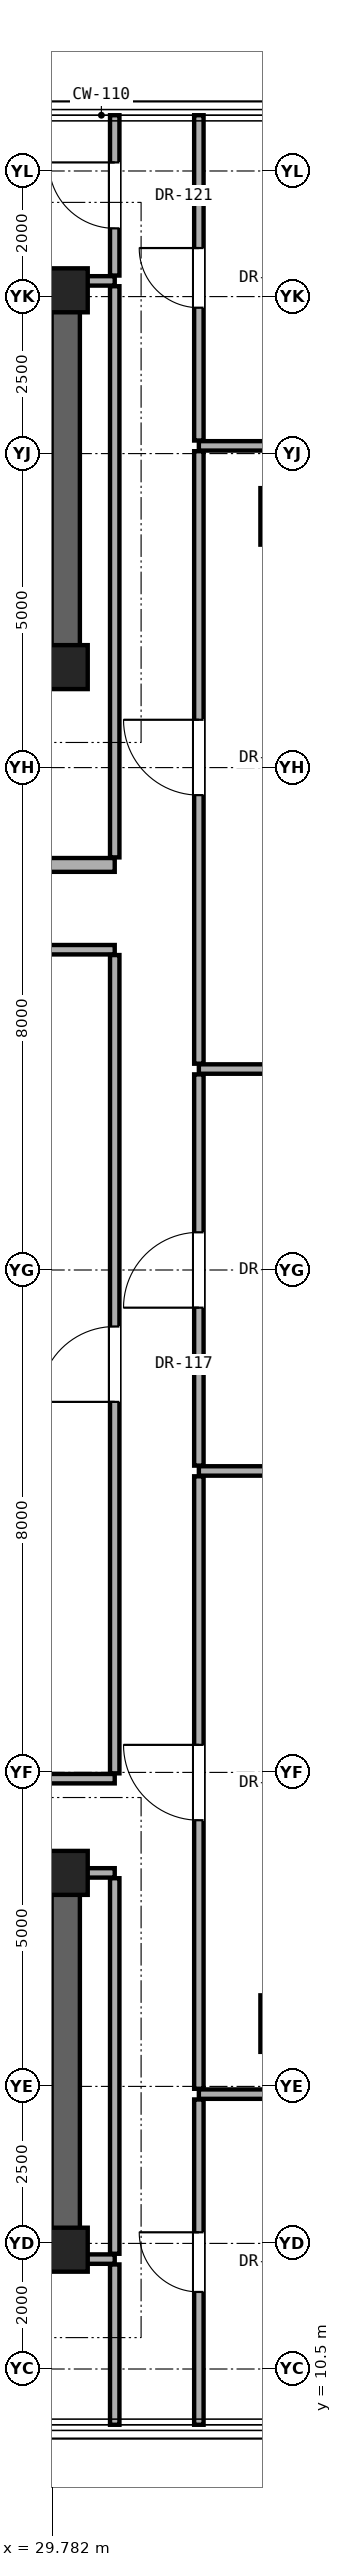
"""IFC4 building model, lengths in metres.
Left out: names, types, materials, properties, quantities, classifications, styles, units other than length and angle.
Written with IfcOpenShell. Run it as: python <this file> out.ifc"""

import sys

from ifc_helpers import new_model, si_unit, direction, frame, frame_2d, origin, origin_2d, place, context, subcontext, project, spatial, rectangle, extrude, element, fill, save


model = new_model("IFC4")
c1 = context("Model", 3, precision=1e-05, world=origin(), true_north=direction((0.0, 1.0)))
c2 = subcontext(c1, "Body", "Model", "MODEL_VIEW")
j1 = project(units=[si_unit("LENGTHUNIT", "METRE"), si_unit("PLANEANGLEUNIT", "RADIAN")], contexts=[c1])
p1 = place(None, origin())
s1 = spatial("IfcSite", under=j1, at=p1, CompositionType="ELEMENT")
p2 = place(p1, origin())
s2 = spatial("IfcBuilding", under=s1, at=p2, CompositionType="ELEMENT")
p3 = place(p2, frame((0.0, 0.0, 252.7)))
s3 = spatial("IfcBuildingStorey", under=s2, at=p3, CompositionType="ELEMENT", Elevation=252.7)
for number, where, z_axis, x_axis in (
    (1, (30.0, 12.4, 0.0), (0.0, 0.0, 1.0), (1.0, 0.0, 0.0)),
    (2, (30.0, 18.4, 0.0), (0.0, 0.0, 1.0), (1.0, 0.0, 0.0)),
    (3, (30.0, 37.6, 0.0), (0.0, 0.0, 1.0), (1.0, 0.0, 0.0)),
    (4, (30.0, 43.6, 0.0), (0.0, 0.0, 1.0), (1.0, 0.0, 0.0)),
):
    element("IfcColumn", number, at=place(p3, frame(where, z_axis=z_axis, x_axis=x_axis)), inside=s3, PredefinedType="COLUMN", context=c2, shape_type="SweptSolid", body=[
        extrude(rectangle(XDim=0.7, YDim=0.7, at=origin_2d()), origin(), (0.0, 0.0, 1.0), 3.6),
    ])
for number, where, z_axis, x_axis in (
    (5, (33.4, 16.0, 0.0), (0.0, 0.0, 1.0), (1.0, 0.0, 0.0)),
    (6, (33.4, 40.0, 0.0), (0.0, 0.0, 1.0), (1.0, 0.0, 0.0)),
):
    element("IfcColumn", number, at=place(p3, frame(where, z_axis=z_axis, x_axis=x_axis)), inside=s3, PredefinedType="PILASTER", context=c2, shape_type="SweptSolid", body=[
        extrude(rectangle(XDim=0.6, YDim=0.9, at=origin_2d()), origin(), (0.0, 0.0, 1.0), 3.6),
    ])
p4 = place(p3, frame((11.0, 43.6, 0.0), z_axis=(0.0, 0.0, 1.0), x_axis=(1.0, 0.0, 0.0)))
e7 = element("IfcWall", 7, at=p4, inside=s3, PredefinedType="SHEAR", context=c2, shape_type="SweptSolid", body=[
    extrude(rectangle(XDim=19.0, YDim=0.45, at=frame_2d((9.5, 0.0))), origin(), (0.0, 0.0, 1.0), 3.4),
])
p5 = place(p3, frame((30.0, 37.6, 0.0), z_axis=(0.0, 0.0, 1.0), x_axis=(0.0, 1.0, 0.0)))
e8 = element("IfcWall", 8, at=p5, inside=s3, PredefinedType="SHEAR", context=c2, shape_type="SweptSolid", body=[
    extrude(rectangle(XDim=6.0, YDim=0.45, at=frame_2d((3.0, 0.0))), origin(), (0.0, 0.0, 1.0), 3.4),
])
p6 = place(p3, frame((11.0, 37.6, 0.0), z_axis=(0.0, 0.0, 1.0), x_axis=(1.0, 0.0, 0.0)))
e9 = element("IfcWall", 9, at=p6, inside=s3, PredefinedType="SHEAR", context=c2, shape_type="SweptSolid", body=[
    extrude(rectangle(XDim=19.0, YDim=0.45, at=frame_2d((9.5, 0.0))), origin(), (0.0, 0.0, 1.0), 3.4),
])
p7 = place(p6, frame((1.06, 0.0, 0.0)))
e10 = element("IfcOpeningElement", 10, at=p7, cuts=e9, PredefinedType="OPENING", context=c2, shape_type="SweptSolid", body=[
    extrude(rectangle(XDim=1.15, YDim=2.2, at=frame_2d((0.575, 1.1))), frame((0.0, 0.235, 0.0), z_axis=(0.0, -1.0, 0.0), x_axis=(1.0, 0.0, 0.0)), (0.0, 0.0, 1.0), 0.47),
])
p8 = place(p6, frame((9.55, 0.0, 0.0)))
e11 = element("IfcOpeningElement", 11, at=p8, cuts=e9, PredefinedType="OPENING", context=c2, shape_type="SweptSolid", body=[
    extrude(rectangle(XDim=1.4, YDim=2.35, at=frame_2d((0.7, 1.175))), frame((0.0, 0.235, 0.0), z_axis=(0.0, -1.0, 0.0), x_axis=(1.0, 0.0, 0.0)), (0.0, 0.0, 1.0), 0.47),
])
p9 = place(p6, frame((11.95, 0.0, 0.0)))
e12 = element("IfcOpeningElement", 12, at=p9, cuts=e9, PredefinedType="OPENING", context=c2, shape_type="SweptSolid", body=[
    extrude(rectangle(XDim=1.4, YDim=2.35, at=frame_2d((0.7, 1.175))), frame((0.0, 0.235, 0.0), z_axis=(0.0, -1.0, 0.0), x_axis=(1.0, 0.0, 0.0)), (0.0, 0.0, 1.0), 0.47),
])
p10 = place(p3, frame((11.0, 12.4, 0.0), z_axis=(0.0, 0.0, 1.0), x_axis=(1.0, 0.0, 0.0)))
e13 = element("IfcWall", 13, at=p10, inside=s3, PredefinedType="SHEAR", context=c2, shape_type="SweptSolid", body=[
    extrude(rectangle(XDim=19.0, YDim=0.45, at=frame_2d((9.5, 0.0))), origin(), (0.0, 0.0, 1.0), 3.4),
])
p11 = place(p3, frame((30.0, 12.4, 0.0), z_axis=(0.0, 0.0, 1.0), x_axis=(0.0, 1.0, 0.0)))
e14 = element("IfcWall", 14, at=p11, inside=s3, PredefinedType="SHEAR", context=c2, shape_type="SweptSolid", body=[
    extrude(rectangle(XDim=6.0, YDim=0.45, at=frame_2d((3.0, 0.0))), origin(), (0.0, 0.0, 1.0), 3.4),
])
p12 = place(p3, frame((11.0, 18.4, 0.0), z_axis=(0.0, 0.0, 1.0), x_axis=(1.0, 0.0, 0.0)))
e15 = element("IfcWall", 15, at=p12, inside=s3, PredefinedType="SHEAR", context=c2, shape_type="SweptSolid", body=[
    extrude(rectangle(XDim=19.0, YDim=0.45, at=frame_2d((9.5, 0.0))), origin(), (0.0, 0.0, 1.0), 3.4),
])
p13 = place(p12, frame((4.175, 0.0, 0.0)))
e16 = element("IfcOpeningElement", 16, at=p13, cuts=e15, PredefinedType="OPENING", context=c2, shape_type="SweptSolid", body=[
    extrude(rectangle(XDim=1.2, YDim=2.25, at=frame_2d((0.6, 1.125))), frame((0.0, 0.235, 0.0), z_axis=(0.0, -1.0, 0.0), x_axis=(1.0, 0.0, 0.0)), (0.0, 0.0, 1.0), 0.47),
])
p14 = place(p12, frame((11.075, 0.0, 0.0)))
e17 = element("IfcOpeningElement", 17, at=p14, cuts=e15, PredefinedType="OPENING", context=c2, shape_type="SweptSolid", body=[
    extrude(rectangle(XDim=0.95, YDim=2.15, at=frame_2d((0.475, 1.075))), frame((0.0, 0.235, 0.0), z_axis=(0.0, -1.0, 0.0), x_axis=(1.0, 0.0, 0.0)), (0.0, 0.0, 1.0), 0.47),
])
p15 = place(p12, frame((14.3, 0.0, 0.0)))
e18 = element("IfcOpeningElement", 18, at=p15, cuts=e15, PredefinedType="OPENING", context=c2, shape_type="SweptSolid", body=[
    extrude(rectangle(XDim=1.3, YDim=2.3, at=frame_2d((0.65, 1.15))), frame((0.0, 0.235, 0.0), z_axis=(0.0, -1.0, 0.0), x_axis=(1.0, 0.0, 0.0)), (0.0, 0.0, 1.0), 0.47),
])
p16 = place(p12, frame((16.6, 0.0, 0.0)))
e19 = element("IfcOpeningElement", 19, at=p16, cuts=e15, PredefinedType="OPENING", context=c2, shape_type="SweptSolid", body=[
    extrude(rectangle(XDim=1.3, YDim=2.3, at=frame_2d((0.65, 1.15))), frame((0.0, 0.235, 0.0), z_axis=(0.0, -1.0, 0.0), x_axis=(1.0, 0.0, 0.0)), (0.0, 0.0, 1.0), 0.47),
])
p17 = place(p3, frame((30.22, 12.25, 0.0), z_axis=(0.0, 0.0, 1.0), x_axis=(1.0, 0.0, 0.0)))
e20 = element("IfcWall", 20, at=p17, inside=s3, PredefinedType="PARTITIONING", context=c2, shape_type="SweptSolid", body=[
    extrude(rectangle(XDim=0.56, YDim=0.15, at=frame_2d((0.28, 0.0))), origin(), (0.0, 0.0, 1.0), 3.4),
])
p18 = place(p3, frame((32.12, 14.877, 0.0), z_axis=(0.0, 0.0, 1.0), x_axis=(1.0, 0.0, 0.0)))
e21 = element("IfcWall", 21, at=p18, inside=s3, PredefinedType="PARTITIONING", context=c2, shape_type="SweptSolid", body=[
    extrude(rectangle(XDim=3.205, YDim=0.15, at=frame_2d((1.603, 0.0))), origin(), (0.0, 0.0, 1.0), 3.4),
])
p19 = place(p3, frame((30.22, 18.4, 0.0), z_axis=(0.0, 0.0, 1.0), x_axis=(1.0, 0.0, 0.0)))
e22 = element("IfcWall", 22, at=p19, inside=s3, PredefinedType="PARTITIONING", context=c2, shape_type="SweptSolid", body=[
    extrude(rectangle(XDim=0.56, YDim=0.15, at=frame_2d((0.28, 0.0))), origin(), (0.0, 0.0, 1.0), 2.792),
])
p20 = place(p3, frame((10.22, 19.9, 0.0), z_axis=(0.0, 0.0, 1.0), x_axis=(1.0, 0.0, 0.0)))
e23 = element("IfcWall", 23, at=p20, inside=s3, PredefinedType="PARTITIONING", context=c2, shape_type="SweptSolid", body=[
    extrude(rectangle(XDim=20.56, YDim=0.15, at=frame_2d((10.28, 0.0))), origin(), (0.0, 0.0, 1.0), 2.536),
])
p21 = place(p20, frame((1.36, 0.0, 0.0)))
e24 = element("IfcOpeningElement", 24, at=p21, cuts=e23, PredefinedType="OPENING", context=c2, shape_type="SweptSolid", body=[
    extrude(rectangle(XDim=0.9, YDim=2.1, at=frame_2d((0.45, 1.05))), frame((0.0, 0.085, 0.0), z_axis=(0.0, -1.0, 0.0), x_axis=(1.0, 0.0, 0.0)), (0.0, 0.0, 1.0), 0.17),
])
p22 = place(p20, frame((9.68, 0.0, 0.0)))
e25 = element("IfcOpeningElement", 25, at=p22, cuts=e23, PredefinedType="OPENING", context=c2, shape_type="SweptSolid", body=[
    extrude(rectangle(XDim=1.2, YDim=2.25, at=frame_2d((0.6, 1.125))), frame((0.0, 0.085, 0.0), z_axis=(0.0, -1.0, 0.0), x_axis=(1.0, 0.0, 0.0)), (0.0, 0.0, 1.0), 0.17),
])
for number, where, z_axis, x_axis in (
    (26, (32.12, 24.8, 0.0), (0.0, 0.0, 1.0), (1.0, 0.0, 0.0)),
    (27, (32.12, 31.2, 0.0), (0.0, 0.0, 1.0), (1.0, 0.0, 0.0)),
):
    element("IfcWall", number, at=place(p3, frame(where, z_axis=z_axis, x_axis=x_axis)), inside=s3, PredefinedType="PARTITIONING", context=c2, shape_type="SweptSolid", body=[
        extrude(rectangle(XDim=8.49, YDim=0.15, at=frame_2d((4.245, 0.0))), origin(), (0.0, 0.0, 1.0), 2.619),
    ])
p23 = place(p3, frame((10.22, 33.1, 0.0), z_axis=(0.0, 0.0, 1.0), x_axis=(1.0, 0.0, 0.0)))
e28 = element("IfcWall", 28, at=p23, inside=s3, PredefinedType="PARTITIONING", context=c2, shape_type="SweptSolid", body=[
    extrude(rectangle(XDim=20.56, YDim=0.15, at=frame_2d((10.28, 0.0))), origin(), (0.0, 0.0, 1.0), 2.536),
])
p24 = place(p3, frame((15.59, 34.45, 0.0), z_axis=(0.0, 0.0, 1.0), x_axis=(1.0, 0.0, 0.0)))
e29 = element("IfcWall", 29, at=p24, inside=s3, PredefinedType="SOLIDWALL", context=c2, shape_type="SweptSolid", body=[
    extrude(rectangle(XDim=15.19, YDim=0.22, at=frame_2d((7.595, 0.0))), origin(), (0.0, 0.0, 1.0), 2.536),
])
p25 = place(p24, frame((6.26, 0.0, 0.0)))
e30 = element("IfcOpeningElement", 30, at=p25, cuts=e29, PredefinedType="OPENING", context=c2, shape_type="SweptSolid", body=[
    extrude(rectangle(XDim=1.2, YDim=2.25, at=frame_2d((0.6, 1.125))), frame((0.0, 0.12, 0.0), z_axis=(0.0, -1.0, 0.0), x_axis=(1.0, 0.0, 0.0)), (0.0, 0.0, 1.0), 0.24),
])
p26 = place(p24, frame((11.085, 0.0, 0.0)))
e31 = element("IfcOpeningElement", 31, at=p26, cuts=e29, PredefinedType="OPENING", context=c2, shape_type="SweptSolid", body=[
    extrude(rectangle(XDim=0.95, YDim=2.15, at=frame_2d((0.475, 1.075))), frame((0.0, 0.12, 0.0), z_axis=(0.0, -1.0, 0.0), x_axis=(1.0, 0.0, 0.0)), (0.0, 0.0, 1.0), 0.24),
])
p27 = place(p24, frame((1.775, 0.0, 0.0)))
e32 = element("IfcOpeningElement", 32, at=p27, cuts=e29, PredefinedType="OPENING", context=c2, shape_type="SweptSolid", body=[
    extrude(rectangle(XDim=0.85, YDim=2.01, at=frame_2d((0.425, 1.005))), frame((0.0, 0.12, 0.0), z_axis=(0.0, -1.0, 0.0), x_axis=(1.0, 0.0, 0.0)), (0.0, 0.0, 1.0), 0.24),
])
p28 = place(p3, frame((32.12, 41.123, 0.0), z_axis=(0.0, 0.0, 1.0), x_axis=(1.0, 0.0, 0.0)))
e33 = element("IfcWall", 33, at=p28, inside=s3, PredefinedType="PARTITIONING", context=c2, shape_type="SweptSolid", body=[
    extrude(rectangle(XDim=3.205, YDim=0.15, at=frame_2d((1.603, 0.0))), origin(), (0.0, 0.0, 1.0), 3.4),
])
p29 = place(p3, frame((30.22, 43.75, 0.0), z_axis=(0.0, 0.0, 1.0), x_axis=(1.0, 0.0, 0.0)))
e34 = element("IfcWall", 34, at=p29, inside=s3, PredefinedType="PARTITIONING", context=c2, shape_type="SweptSolid", body=[
    extrude(rectangle(XDim=0.56, YDim=0.15, at=frame_2d((0.28, 0.0))), origin(), (0.0, 0.0, 1.0), 3.4),
])
p30 = place(p3, frame((30.78, 9.612, 0.0), z_axis=(0.0, 0.0, 1.0), x_axis=(0.0, 1.0, 0.0)))
e35 = element("IfcWall", 35, at=p30, inside=s3, PredefinedType="PARTITIONING", context=c2, shape_type="SweptSolid", body=[
    extrude(rectangle(XDim=2.553, YDim=0.15, at=frame_2d((1.276, 0.0))), origin(), (0.0, 0.0, 1.0), 3.4),
])
p31 = place(p3, frame((30.78, 12.335, 0.0), z_axis=(0.0, 0.0, 1.0), x_axis=(0.0, 1.0, 0.0)))
e36 = element("IfcWall", 36, at=p31, inside=s3, PredefinedType="PARTITIONING", context=c2, shape_type="SweptSolid", body=[
    extrude(rectangle(XDim=5.98, YDim=0.15, at=frame_2d((2.99, 0.0))), origin(), (0.0, 0.0, 1.0), 2.792),
])
p32 = place(p3, frame((30.78, 19.985, 0.0), z_axis=(0.0, 0.0, 1.0), x_axis=(0.0, 1.0, 0.0)))
e37 = element("IfcWall", 37, at=p32, inside=s3, PredefinedType="PARTITIONING", context=c2, shape_type="SweptSolid", body=[
    extrude(rectangle(XDim=13.03, YDim=0.15, at=frame_2d((6.515, 0.0))), origin(), (0.0, 0.0, 1.0), 2.696),
])
p33 = place(p32, frame((5.915, 0.0, 0.0)))
e38 = element("IfcOpeningElement", 38, at=p33, cuts=e37, PredefinedType="OPENING", context=c2, shape_type="SweptSolid", body=[
    extrude(rectangle(XDim=1.2, YDim=2.25, at=frame_2d((0.6, 1.125))), frame((0.0, 0.085, 0.0), z_axis=(0.0, -1.0, 0.0), x_axis=(1.0, 0.0, 0.0)), (0.0, 0.0, 1.0), 0.17),
])
p34 = place(p3, frame((30.78, 34.57, 0.0), z_axis=(0.0, 0.0, 1.0), x_axis=(0.0, 1.0, 0.0)))
e39 = element("IfcWall", 39, at=p34, inside=s3, PredefinedType="PARTITIONING", context=c2, shape_type="SweptSolid", body=[
    extrude(rectangle(XDim=9.095, YDim=0.15, at=frame_2d((4.547, 0.0))), origin(), (0.0, 0.0, 1.0), 2.792),
])
p35 = place(p3, frame((30.78, 43.835, 0.0), z_axis=(0.0, 0.0, 1.0), x_axis=(0.0, 1.0, 0.0)))
e40 = element("IfcWall", 40, at=p35, inside=s3, PredefinedType="PARTITIONING", context=c2, shape_type="SweptSolid", body=[
    extrude(rectangle(XDim=2.553, YDim=0.15, at=frame_2d((1.276, 0.0))), origin(), (0.0, 0.0, 1.0), 3.4),
])
p36 = place(p35, frame((0.751, 0.0, 0.0)))
e41 = element("IfcOpeningElement", 41, at=p36, cuts=e40, PredefinedType="OPENING", context=c2, shape_type="SweptSolid", body=[
    extrude(rectangle(XDim=1.05, YDim=2.2, at=frame_2d((0.525, 1.1))), frame((0.0, 0.085, 0.0), z_axis=(0.0, -1.0, 0.0), x_axis=(1.0, 0.0, 0.0)), (0.0, 0.0, 1.0), 0.17),
])
p37 = place(p3, frame((32.12, 9.612, 0.0), z_axis=(0.0, 0.0, 1.0), x_axis=(0.0, 1.0, 0.0)))
e42 = element("IfcWall", 42, at=p37, inside=s3, PredefinedType="PARTITIONING", context=c2, shape_type="SweptSolid", body=[
    extrude(rectangle(XDim=5.18, YDim=0.15, at=frame_2d((2.59, 0.0))), origin(), (0.0, 0.0, 1.0), 3.4),
])
p38 = place(p37, frame((2.115, 0.0, 0.0)))
e43 = element("IfcOpeningElement", 43, at=p38, cuts=e42, PredefinedType="OPENING", context=c2, shape_type="SweptSolid", body=[
    extrude(rectangle(XDim=0.95, YDim=2.15, at=frame_2d((0.475, 1.075))), frame((0.0, 0.085, 0.0), z_axis=(0.0, -1.0, 0.0), x_axis=(1.0, 0.0, 0.0)), (0.0, 0.0, 1.0), 0.17),
])
p39 = place(p3, frame((32.12, 14.962, 0.0), z_axis=(0.0, 0.0, 1.0), x_axis=(0.0, 1.0, 0.0)))
e44 = element("IfcWall", 44, at=p39, inside=s3, PredefinedType="PARTITIONING", context=c2, shape_type="SweptSolid", body=[
    extrude(rectangle(XDim=9.753, YDim=0.15, at=frame_2d((4.876, 0.0))), origin(), (0.0, 0.0, 1.0), 2.696),
])
p40 = place(p39, frame((4.277, 0.0, 0.0)))
e45 = element("IfcOpeningElement", 45, at=p40, cuts=e44, PredefinedType="OPENING", context=c2, shape_type="SweptSolid", body=[
    extrude(rectangle(XDim=1.2, YDim=2.25, at=frame_2d((0.6, 1.125))), frame((0.0, 0.085, 0.0), z_axis=(0.0, -1.0, 0.0), x_axis=(1.0, 0.0, 0.0)), (0.0, 0.0, 1.0), 0.17),
])
p41 = place(p3, frame((32.12, 24.885, 0.0), z_axis=(0.0, 0.0, 1.0), x_axis=(0.0, 1.0, 0.0)))
e46 = element("IfcWall", 46, at=p41, inside=s3, PredefinedType="PARTITIONING", context=c2, shape_type="SweptSolid", body=[
    extrude(rectangle(XDim=6.23, YDim=0.15, at=frame_2d((3.115, 0.0))), origin(), (0.0, 0.0, 1.0), 2.696),
])
p42 = place(p41, frame((2.515, 0.0, 0.0)))
e47 = element("IfcOpeningElement", 47, at=p42, cuts=e46, PredefinedType="OPENING", context=c2, shape_type="SweptSolid", body=[
    extrude(rectangle(XDim=1.2, YDim=2.25, at=frame_2d((0.6, 1.125))), frame((0.0, 0.085, 0.0), z_axis=(0.0, -1.0, 0.0), x_axis=(1.0, 0.0, 0.0)), (0.0, 0.0, 1.0), 0.17),
])
p43 = place(p3, frame((32.12, 31.285, 0.0), z_axis=(0.0, 0.0, 1.0), x_axis=(0.0, 1.0, 0.0)))
e48 = element("IfcWall", 48, at=p43, inside=s3, PredefinedType="PARTITIONING", context=c2, shape_type="SweptSolid", body=[
    extrude(rectangle(XDim=9.753, YDim=0.15, at=frame_2d((4.876, 0.0))), origin(), (0.0, 0.0, 1.0), 2.696),
])
p44 = place(p43, frame((4.277, 0.0, 0.0)))
e49 = element("IfcOpeningElement", 49, at=p44, cuts=e48, PredefinedType="OPENING", context=c2, shape_type="SweptSolid", body=[
    extrude(rectangle(XDim=1.2, YDim=2.25, at=frame_2d((0.6, 1.125))), frame((0.0, 0.085, 0.0), z_axis=(0.0, -1.0, 0.0), x_axis=(1.0, 0.0, 0.0)), (0.0, 0.0, 1.0), 0.17),
])
p45 = place(p3, frame((32.12, 41.208, 0.0), z_axis=(0.0, 0.0, 1.0), x_axis=(0.0, 1.0, 0.0)))
e50 = element("IfcWall", 50, at=p45, inside=s3, PredefinedType="PARTITIONING", context=c2, shape_type="SweptSolid", body=[
    extrude(rectangle(XDim=5.18, YDim=0.15, at=frame_2d((2.59, 0.0))), origin(), (0.0, 0.0, 1.0), 3.4),
])
p46 = place(p45, frame((2.115, 0.0, 0.0)))
e51 = element("IfcOpeningElement", 51, at=p46, cuts=e50, PredefinedType="OPENING", context=c2, shape_type="SweptSolid", body=[
    extrude(rectangle(XDim=0.95, YDim=2.15, at=frame_2d((0.475, 1.075))), frame((0.0, 0.085, 0.0), z_axis=(0.0, -1.0, 0.0), x_axis=(1.0, 0.0, 0.0)), (0.0, 0.0, 1.0), 0.17),
])
p47 = place(p40, origin())
e52 = element("IfcDoor", 52, at=p47, inside=s3, OperationType="SINGLE_SWING_RIGHT", PredefinedType="DOOR", context=c2, shape_type="SweptSolid", body=[
    extrude(rectangle(XDim=1.2, YDim=2.25, at=frame_2d((0.6, 1.125))), frame((0.0, 0.025, 0.0), z_axis=(0.0, -1.0, 0.0), x_axis=(1.0, 0.0, 0.0)), (0.0, 0.0, 1.0), 0.05),
])
fill(e45, e52)
p48 = place(p42, origin())
e53 = element("IfcDoor", 53, at=p48, inside=s3, OperationType="SINGLE_SWING_LEFT", PredefinedType="DOOR", context=c2, shape_type="SweptSolid", body=[
    extrude(rectangle(XDim=1.2, YDim=2.25, at=frame_2d((0.6, 1.125))), frame((0.0, 0.025, 0.0), z_axis=(0.0, -1.0, 0.0), x_axis=(1.0, 0.0, 0.0)), (0.0, 0.0, 1.0), 0.05),
])
fill(e47, e53)
p49 = place(p44, origin())
e54 = element("IfcDoor", 54, at=p49, inside=s3, OperationType="SINGLE_SWING_RIGHT", PredefinedType="DOOR", context=c2, shape_type="SweptSolid", body=[
    extrude(rectangle(XDim=1.2, YDim=2.25, at=frame_2d((0.6, 1.125))), frame((0.0, 0.025, 0.0), z_axis=(0.0, -1.0, 0.0), x_axis=(1.0, 0.0, 0.0)), (0.0, 0.0, 1.0), 0.05),
])
fill(e49, e54)
p50 = place(p33, origin())
e55 = element("IfcDoor", 55, at=p50, inside=s3, OperationType="SINGLE_SWING_LEFT", PredefinedType="DOOR", context=c2, shape_type="SweptSolid", body=[
    extrude(rectangle(XDim=1.2, YDim=2.25, at=frame_2d((0.6, 1.125))), frame((0.0, 0.025, 0.0), z_axis=(0.0, -1.0, 0.0), x_axis=(1.0, 0.0, 0.0)), (0.0, 0.0, 1.0), 0.05),
])
fill(e38, e55)
p51 = place(p38, origin())
e56 = element("IfcDoor", 56, at=p51, inside=s3, OperationType="SINGLE_SWING_RIGHT", PredefinedType="DOOR", context=c2, shape_type="SweptSolid", body=[
    extrude(rectangle(XDim=0.95, YDim=2.15, at=frame_2d((0.475, 1.075))), frame((0.0, 0.025, 0.0), z_axis=(0.0, -1.0, 0.0), x_axis=(1.0, 0.0, 0.0)), (0.0, 0.0, 1.0), 0.05),
])
fill(e43, e56)
p52 = place(p36, origin())
e57 = element("IfcDoor", 57, at=p52, inside=s3, OperationType="SINGLE_SWING_RIGHT", PredefinedType="DOOR", context=c2, shape_type="SweptSolid", body=[
    extrude(rectangle(XDim=1.05, YDim=2.2, at=frame_2d((0.525, 1.1))), frame((0.0, 0.025, 0.0), z_axis=(0.0, -1.0, 0.0), x_axis=(1.0, 0.0, 0.0)), (0.0, 0.0, 1.0), 0.05),
])
fill(e41, e57)
p53 = place(p46, origin())
e58 = element("IfcDoor", 58, at=p53, inside=s3, OperationType="SINGLE_SWING_RIGHT", PredefinedType="DOOR", context=c2, shape_type="SweptSolid", body=[
    extrude(rectangle(XDim=0.95, YDim=2.15, at=frame_2d((0.475, 1.075))), frame((0.0, 0.025, 0.0), z_axis=(0.0, -1.0, 0.0), x_axis=(1.0, 0.0, 0.0)), (0.0, 0.0, 1.0), 0.05),
])
fill(e51, e58)
save(model, sys.argv[1])
